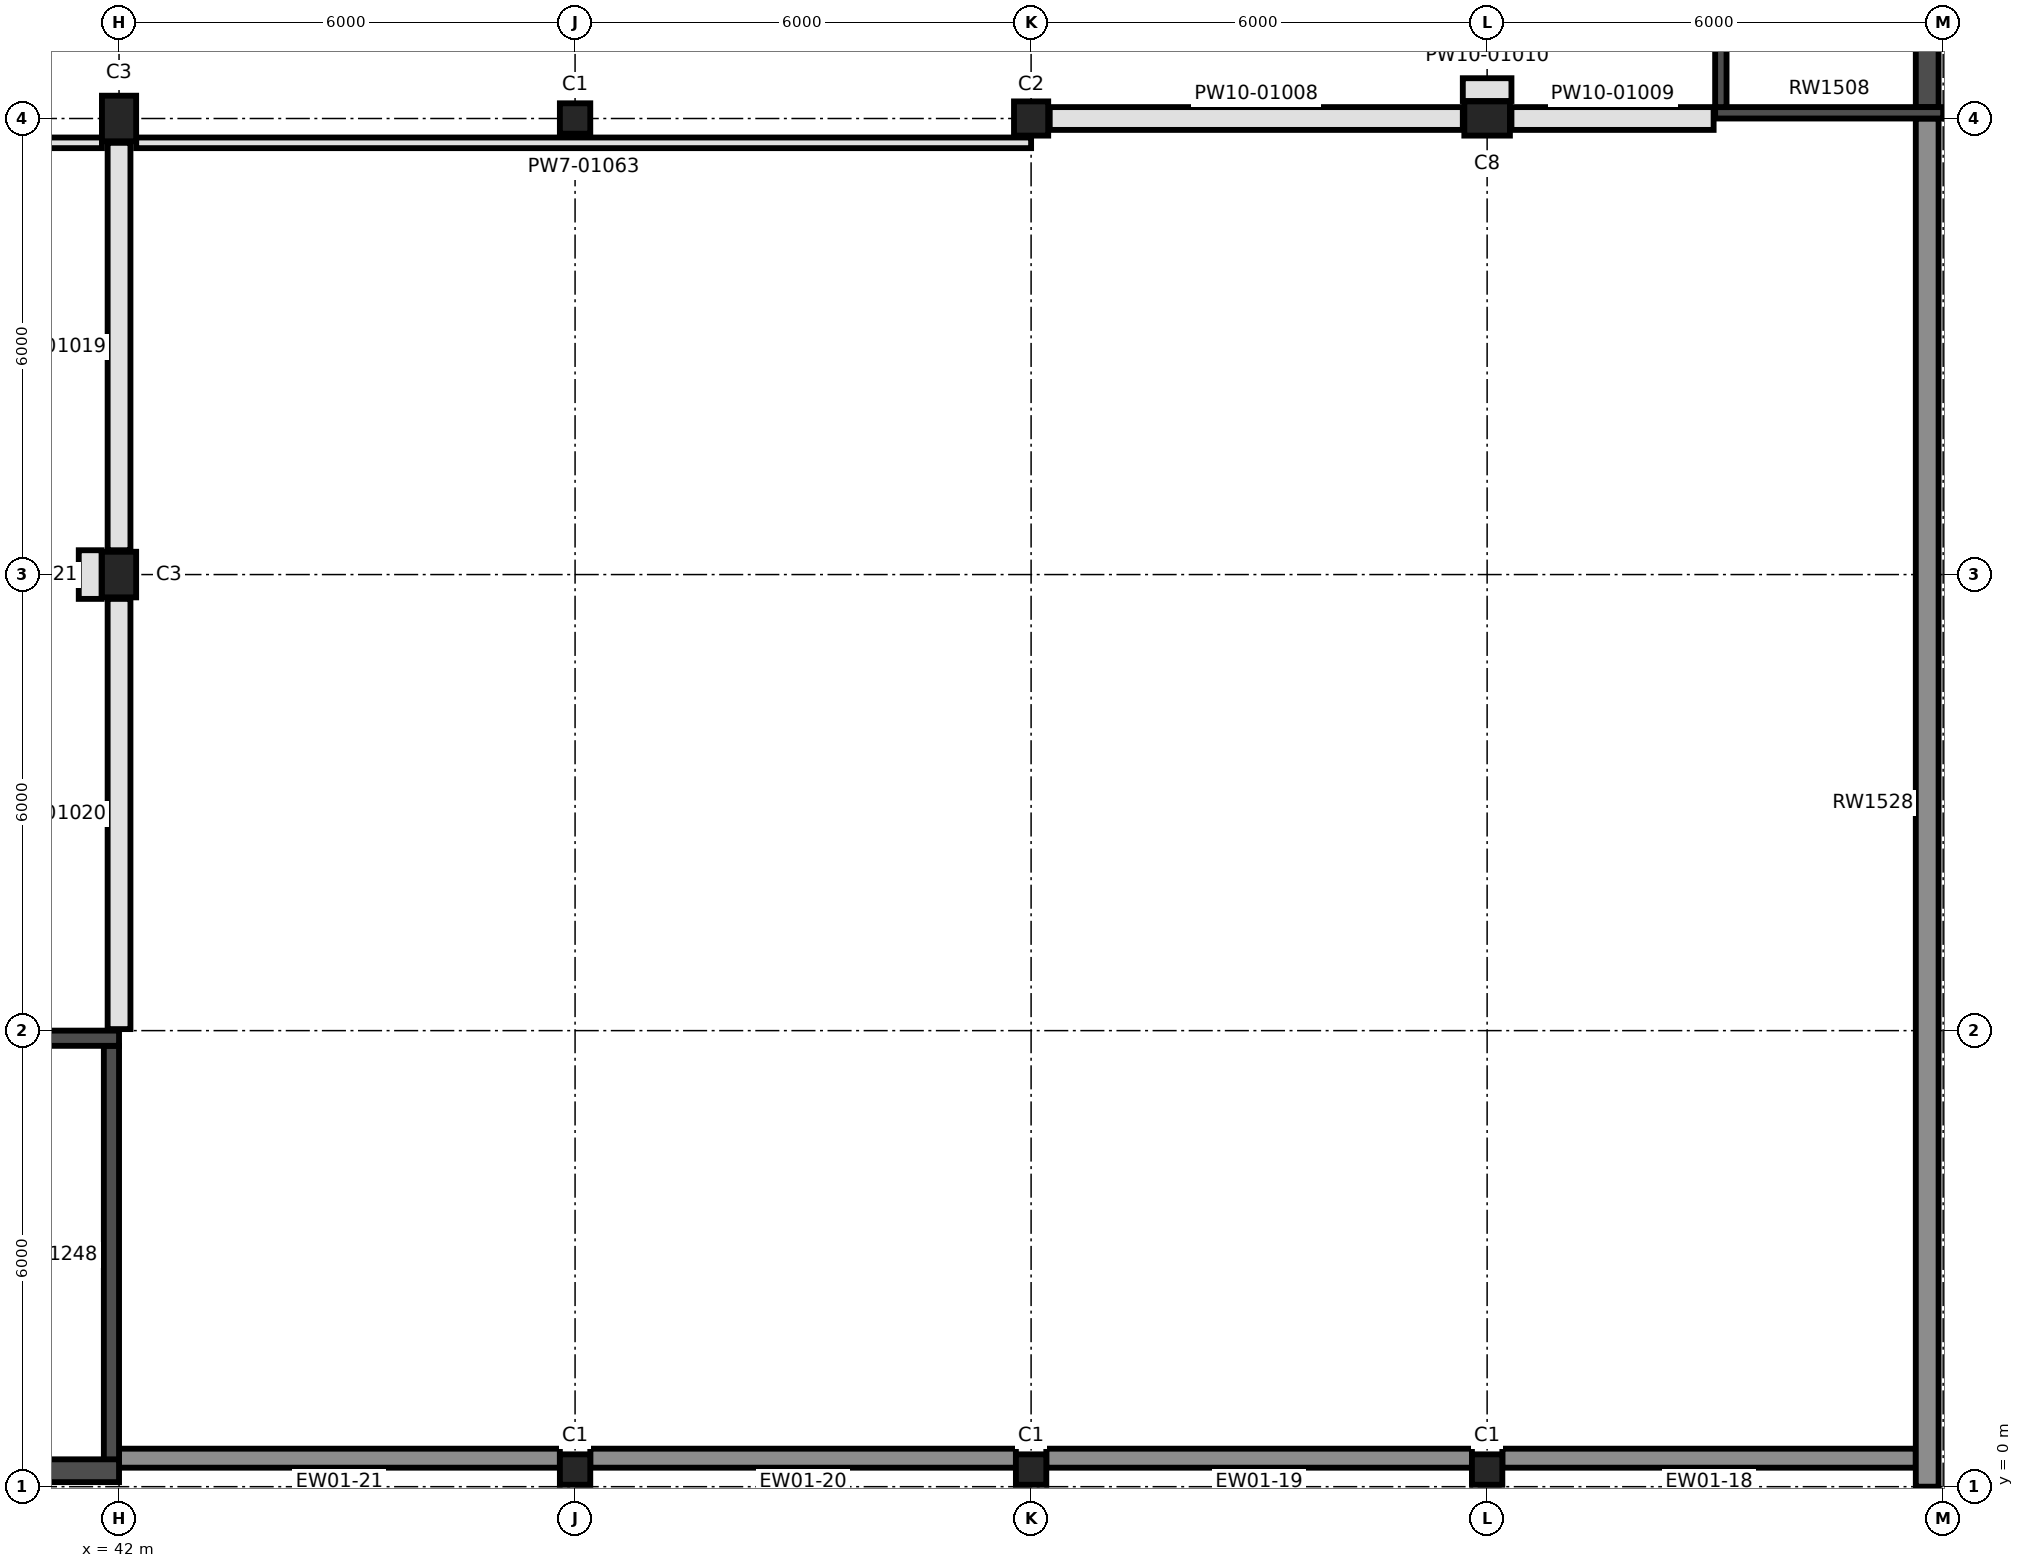
"""IFC4 building model, lengths in metres.
Left out: names, types, materials, properties, quantities, classifications, styles, units other than length and angle.
Written with IfcOpenShell. Run it as: python <this file> out.ifc"""

import sys

from ifc_helpers import new_model, si_unit, direction, frame, frame_2d, origin, origin_2d, place, context, subcontext, project, spatial, rectangle, extrude, element, fill, save


model = new_model("IFC4")
c1 = context("Model", 3, precision=1e-05, world=origin(), true_north=direction((0.0, 1.0)))
c2 = subcontext(c1, "Body", "Model", "MODEL_VIEW")
j1 = project(units=[si_unit("LENGTHUNIT", "METRE"), si_unit("PLANEANGLEUNIT", "RADIAN")], contexts=[c1])
p1 = place(None, origin())
s1 = spatial("IfcSite", under=j1, at=p1, CompositionType="ELEMENT")
p2 = place(p1, origin())
s2 = spatial("IfcBuilding", under=s1, at=p2, CompositionType="ELEMENT")
p3 = place(p2, frame((0.0, 0.0, 7.0)))
s3 = spatial("IfcBuildingStorey", under=s2, at=p3, CompositionType="ELEMENT", Elevation=7.0)
for number, where, z_axis, x_axis in (
    (1, (48.0, 0.226, 0.0), (0.0, 0.0, 1.0), (1.0, 0.0, 0.0)),
    (2, (54.0, 0.226, 0.0), (0.0, 0.0, 1.0), (1.0, 0.0, 0.0)),
    (3, (60.0, 0.226, 0.0), (0.0, 0.0, 1.0), (1.0, 0.0, 0.0)),
):
    element("IfcColumn", number, at=place(p3, frame(where, z_axis=z_axis, x_axis=x_axis)), inside=s3, PredefinedType="COLUMN", context=c2, shape_type="SweptSolid", body=[
        extrude(rectangle(XDim=0.4, YDim=0.4, at=origin_2d()), origin(), (0.0, 0.0, 1.0), 5.0),
    ])
for number, where, z_axis, x_axis in (
    (4, (42.0, 12.0, 0.0), (0.0, 0.0, 1.0), (1.0, 0.0, 0.0)),
    (5, (42.0, 18.0, 0.0), (0.0, 0.0, 1.0), (1.0, 0.0, 0.0)),
):
    element("IfcColumn", number, at=place(p3, frame(where, z_axis=z_axis, x_axis=x_axis)), inside=s3, PredefinedType="COLUMN", context=c2, shape_type="SweptSolid", body=[
        extrude(rectangle(XDim=0.45, YDim=0.6, at=origin_2d()), origin(), (0.0, 0.0, 1.0), 5.0),
    ])
p4 = place(p3, frame((48.0, 18.0, 0.0), z_axis=(0.0, 0.0, 1.0), x_axis=(1.0, 0.0, 0.0)))
e6 = element("IfcColumn", 6, at=p4, inside=s3, PredefinedType="COLUMN", context=c2, shape_type="SweptSolid", body=[
    extrude(rectangle(XDim=0.4, YDim=0.4, at=origin_2d()), origin(), (0.0, 0.0, 1.0), 5.0),
])
p5 = place(p3, frame((54.0, 18.0, 0.0), z_axis=(0.0, 0.0, 1.0), x_axis=(1.0, 0.0, 0.0)))
e7 = element("IfcColumn", 7, at=p5, inside=s3, PredefinedType="COLUMN", context=c2, shape_type="SweptSolid", body=[
    extrude(rectangle(XDim=0.45, YDim=0.45, at=origin_2d()), origin(), (0.0, 0.0, 1.0), 5.0),
])
p6 = place(p3, frame((60.0, 18.0, 0.0), z_axis=(0.0, 0.0, 1.0), x_axis=(1.0, 0.0, 0.0)))
e8 = element("IfcColumn", 8, at=p6, inside=s3, PredefinedType="COLUMN", context=c2, shape_type="SweptSolid", body=[
    extrude(rectangle(XDim=0.6, YDim=0.45, at=origin_2d()), origin(), (0.0, 0.0, 1.0), 5.0),
])
p7 = place(p3, frame((36.0, 5.9, 0.0), z_axis=(0.0, 0.0, 1.0), x_axis=(1.0, 0.0, 0.0)))
e9 = element("IfcWall", 9, at=p7, inside=s3, PredefinedType="SHEAR", context=c2, shape_type="SweptSolid", body=[
    extrude(rectangle(XDim=6.0, YDim=0.2, at=frame_2d((3.0, 0.0))), origin(), (0.0, 0.0, 1.0), 5.0),
])
p8 = place(p7, frame((0.3, 0.0, 0.0)))
e10 = element("IfcOpeningElement", 10, at=p8, cuts=e9, PredefinedType="OPENING", context=c2, shape_type="SweptSolid", body=[
    extrude(rectangle(XDim=1.1, YDim=2.2, at=frame_2d((0.55, 1.1))), frame((0.0, 0.11, 0.0), z_axis=(0.0, -1.0, 0.0), x_axis=(1.0, 0.0, 0.0)), (0.0, 0.0, 1.0), 0.22),
])
p9 = place(p3, frame((36.0, 0.21, 0.0), z_axis=(0.0, 0.0, 1.0), x_axis=(1.0, 0.0, 0.0)))
e11 = element("IfcWall", 11, at=p9, inside=s3, PredefinedType="SHEAR", context=c2, shape_type="SweptSolid", body=[
    extrude(rectangle(XDim=6.0, YDim=0.3, at=frame_2d((3.0, 0.0))), origin(), (0.0, 0.0, 1.0), 5.0),
])
p10 = place(p3, frame((41.9, 0.3, 0.0), z_axis=(0.0, 0.0, 1.0), x_axis=(0.0, 1.0, 0.0)))
e12 = element("IfcWall", 12, at=p10, inside=s3, PredefinedType="SHEAR", context=c2, shape_type="SweptSolid", body=[
    extrude(rectangle(XDim=5.5, YDim=0.2, at=frame_2d((2.75, 0.0))), origin(), (0.0, 0.0, 1.0), 5.0),
])
p11 = place(p3, frame((63.0, 18.075, 0.0), z_axis=(0.0, 0.0, 1.0), x_axis=(1.0, 0.0, 0.0)))
e13 = element("IfcWall", 13, at=p11, inside=s3, PredefinedType="SHEAR", context=c2, shape_type="SweptSolid", body=[
    extrude(rectangle(XDim=3.0, YDim=0.15, at=frame_2d((1.5, 0.0))), origin(), (0.0, 0.0, 1.0), 5.0),
])
p12 = place(p3, frame((63.075, 18.15, 0.0), z_axis=(0.0, 0.0, 1.0), x_axis=(0.0, 1.0, 0.0)))
e14 = element("IfcWall", 14, at=p12, inside=s3, PredefinedType="SHEAR", context=c2, shape_type="SweptSolid", body=[
    extrude(rectangle(XDim=5.7, YDim=0.15, at=frame_2d((2.85, 0.0))), origin(), (0.0, 0.0, 1.0), 5.0),
])
p13 = place(p3, frame((65.79, 18.15, 0.0), z_axis=(0.0, 0.0, 1.0), x_axis=(0.0, 1.0, 0.0)))
e15 = element("IfcWall", 15, at=p13, inside=s3, PredefinedType="SHEAR", context=c2, shape_type="SweptSolid", body=[
    extrude(rectangle(XDim=5.7, YDim=0.3, at=frame_2d((2.85, 0.0))), origin(), (0.0, 0.0, 1.0), 5.0),
])
p14 = place(p3, frame((65.79, 0.0, 0.0), z_axis=(0.0, 0.0, 1.0), x_axis=(0.0, 1.0, 0.0)))
e16 = element("IfcWall", 16, at=p14, inside=s3, PredefinedType="SOLIDWALL", context=c2, shape_type="SweptSolid", body=[
    extrude(rectangle(XDim=18.0, YDim=0.3, at=frame_2d((9.0, 0.0))), origin(), (0.0, 0.0, 1.0), 5.0),
])
p15 = place(p3, frame((65.64, 0.375, 0.0), z_axis=(0.0, 0.0, 1.0), x_axis=(-1.0, 0.0, 0.0)))
e17 = element("IfcWall", 17, at=p15, inside=s3, PredefinedType="SOLIDWALL", context=c2, shape_type="SweptSolid", body=[
    extrude(rectangle(XDim=5.44, YDim=0.25, at=frame_2d((2.72, 0.0))), origin(), (0.0, 0.0, 1.0), 9.5),
])
for number, where, z_axis, x_axis in (
    (18, (59.8, 0.375, 0.0), (0.0, 0.0, 1.0), (-1.0, 0.0, 0.0)),
    (19, (53.8, 0.375, 0.0), (0.0, 0.0, 1.0), (-1.0, 0.0, 0.0)),
):
    element("IfcWall", number, at=place(p3, frame(where, z_axis=z_axis, x_axis=x_axis)), inside=s3, PredefinedType="SOLIDWALL", context=c2, shape_type="SweptSolid", body=[
        extrude(rectangle(XDim=5.6, YDim=0.25, at=frame_2d((2.8, 0.0))), origin(), (0.0, 0.0, 1.0), 9.5),
    ])
p16 = place(p3, frame((47.8, 0.375, 0.0), z_axis=(0.0, 0.0, 1.0), x_axis=(-1.0, 0.0, 0.0)))
e20 = element("IfcWall", 20, at=p16, inside=s3, PredefinedType="SOLIDWALL", context=c2, shape_type="SweptSolid", body=[
    extrude(rectangle(XDim=5.8, YDim=0.25, at=frame_2d((2.9, 0.0))), origin(), (0.0, 0.0, 1.0), 9.5),
])
p17 = place(p3, frame((54.245, 18.0, 0.0), z_axis=(0.0, 0.0, 1.0), x_axis=(1.0, 0.0, 0.0)))
e21 = element("IfcWall", 21, at=p17, inside=s3, PredefinedType="PARTITIONING", context=c2, shape_type="SweptSolid", body=[
    extrude(rectangle(XDim=5.435, YDim=0.3, at=frame_2d((2.717, 0.0))), origin(), (0.0, 0.0, 1.0), 4.1),
])
p18 = place(p17, frame((0.305, 0.0, 0.0)))
e22 = element("IfcOpeningElement", 22, at=p18, cuts=e21, PredefinedType="OPENING", context=c2, shape_type="SweptSolid", body=[
    extrude(rectangle(XDim=1.8, YDim=2.1, at=frame_2d((0.9, 1.05))), frame((0.0, 0.16, 0.0), z_axis=(0.0, -1.0, 0.0), x_axis=(1.0, 0.0, 0.0)), (0.0, 0.0, 1.0), 0.32),
])
p19 = place(p17, frame((3.505, 0.0, 0.0)))
e23 = element("IfcOpeningElement", 23, at=p19, cuts=e21, PredefinedType="OPENING", context=c2, shape_type="SweptSolid", body=[
    extrude(rectangle(XDim=1.8, YDim=2.1, at=frame_2d((0.9, 1.05))), frame((0.0, 0.16, 0.0), z_axis=(0.0, -1.0, 0.0), x_axis=(1.0, 0.0, 0.0)), (0.0, 0.0, 1.0), 0.32),
])
p20 = place(p3, frame((60.32, 18.0, 0.0), z_axis=(0.0, 0.0, 1.0), x_axis=(1.0, 0.0, 0.0)))
e24 = element("IfcWall", 24, at=p20, inside=s3, PredefinedType="PARTITIONING", context=c2, shape_type="SweptSolid", body=[
    extrude(rectangle(XDim=2.66, YDim=0.3, at=frame_2d((1.33, 0.0))), origin(), (0.0, 0.0, 1.0), 4.1),
])
p21 = place(p3, frame((59.68, 18.38, 0.0), z_axis=(0.0, 0.0, 1.0), x_axis=(1.0, 0.0, 0.0)))
e25 = element("IfcWall", 25, at=p21, inside=s3, PredefinedType="PARTITIONING", context=c2, shape_type="SweptSolid", body=[
    extrude(rectangle(XDim=0.64, YDim=0.3, at=frame_2d((0.32, 0.0))), origin(), (0.0, 0.0, 1.0), 4.1),
])
p22 = place(p3, frame((42.0, 12.32, 0.0), z_axis=(0.0, 0.0, 1.0), x_axis=(0.0, 1.0, 0.0)))
e26 = element("IfcWall", 26, at=p22, inside=s3, PredefinedType="PARTITIONING", context=c2, shape_type="SweptSolid", body=[
    extrude(rectangle(XDim=5.36, YDim=0.3, at=frame_2d((2.68, 0.0))), origin(), (0.0, 0.0, 1.0), 4.1),
])
p23 = place(p22, frame((1.73, 0.0, 0.0)))
e27 = element("IfcOpeningElement", 27, at=p23, cuts=e26, PredefinedType="OPENING", context=c2, shape_type="SweptSolid", body=[
    extrude(rectangle(XDim=1.8, YDim=2.1, at=frame_2d((0.9, 1.05))), frame((0.0, 0.16, 0.0), z_axis=(0.0, -1.0, 0.0), x_axis=(1.0, 0.0, 0.0)), (0.0, 0.0, 1.0), 0.32),
])
p24 = place(p3, frame((42.0, 6.02, 0.0), z_axis=(0.0, 0.0, 1.0), x_axis=(0.0, 1.0, 0.0)))
e28 = element("IfcWall", 28, at=p24, inside=s3, PredefinedType="PARTITIONING", context=c2, shape_type="SweptSolid", body=[
    extrude(rectangle(XDim=5.66, YDim=0.3, at=frame_2d((2.83, 0.0))), origin(), (0.0, 0.0, 1.0), 4.1),
])
p25 = place(p24, frame((2.03, 0.0, 0.0)))
e29 = element("IfcOpeningElement", 29, at=p25, cuts=e28, PredefinedType="OPENING", context=c2, shape_type="SweptSolid", body=[
    extrude(rectangle(XDim=1.8, YDim=2.1, at=frame_2d((0.9, 1.05))), frame((0.0, 0.16, 0.0), z_axis=(0.0, -1.0, 0.0), x_axis=(1.0, 0.0, 0.0)), (0.0, 0.0, 1.0), 0.32),
])
p26 = place(p3, frame((41.62, 11.68, 0.0), z_axis=(0.0, 0.0, 1.0), x_axis=(0.0, 1.0, 0.0)))
e30 = element("IfcWall", 30, at=p26, inside=s3, PredefinedType="PARTITIONING", context=c2, shape_type="SweptSolid", body=[
    extrude(rectangle(XDim=0.64, YDim=0.3, at=frame_2d((0.32, 0.0))), origin(), (0.0, 0.0, 1.0), 4.1),
])
p27 = place(p3, frame((36.0, 17.68, 0.0), z_axis=(0.0, 0.0, 1.0), x_axis=(1.0, 0.0, 0.0)))
e31 = element("IfcWall", 31, at=p27, inside=s3, PredefinedType="PARTITIONING", context=c2, shape_type="SweptSolid", body=[
    extrude(rectangle(XDim=5.775, YDim=0.14, at=frame_2d((2.887, 0.0))), origin(), (0.0, 0.0, 1.0), 4.1),
])
p28 = place(p3, frame((42.225, 17.68, 0.0), z_axis=(0.0, 0.0, 1.0), x_axis=(1.0, 0.0, 0.0)))
e32 = element("IfcWall", 32, at=p28, inside=s3, PredefinedType="PARTITIONING", context=c2, shape_type="SweptSolid", body=[
    extrude(rectangle(XDim=11.775, YDim=0.14, at=frame_2d((5.887, 0.0))), origin(), (0.0, 0.0, 1.0), 5.0),
])
p29 = place(p25, origin())
e33 = element("IfcDoor", 33, at=p29, inside=s3, OperationType="DOUBLE_DOOR_SINGLE_SWING", PredefinedType="DOOR", context=c2, shape_type="SweptSolid", body=[
    extrude(rectangle(XDim=1.8, YDim=2.1, at=frame_2d((0.9, 1.05))), frame((0.0, 0.025, 0.0), z_axis=(0.0, -1.0, 0.0), x_axis=(1.0, 0.0, 0.0)), (0.0, 0.0, 1.0), 0.05),
])
fill(e29, e33)
p30 = place(p23, origin())
e34 = element("IfcDoor", 34, at=p30, inside=s3, OperationType="DOUBLE_DOOR_SINGLE_SWING", PredefinedType="DOOR", context=c2, shape_type="SweptSolid", body=[
    extrude(rectangle(XDim=1.8, YDim=2.1, at=frame_2d((0.9, 1.05))), frame((0.0, 0.025, 0.0), z_axis=(0.0, -1.0, 0.0), x_axis=(1.0, 0.0, 0.0)), (0.0, 0.0, 1.0), 0.05),
])
fill(e27, e34)
p31 = place(p18, origin())
e35 = element("IfcDoor", 35, at=p31, inside=s3, OperationType="DOUBLE_DOOR_SINGLE_SWING", PredefinedType="DOOR", context=c2, shape_type="SweptSolid", body=[
    extrude(rectangle(XDim=1.8, YDim=2.1, at=frame_2d((0.9, 1.05))), frame((0.0, 0.025, 0.0), z_axis=(0.0, -1.0, 0.0), x_axis=(1.0, 0.0, 0.0)), (0.0, 0.0, 1.0), 0.05),
])
fill(e22, e35)
p32 = place(p19, origin())
e36 = element("IfcDoor", 36, at=p32, inside=s3, OperationType="DOUBLE_DOOR_SINGLE_SWING", PredefinedType="DOOR", context=c2, shape_type="SweptSolid", body=[
    extrude(rectangle(XDim=1.8, YDim=2.1, at=frame_2d((0.9, 1.05))), frame((0.0, 0.025, 0.0), z_axis=(0.0, -1.0, 0.0), x_axis=(1.0, 0.0, 0.0)), (0.0, 0.0, 1.0), 0.05),
])
fill(e23, e36)
save(model, sys.argv[1])
